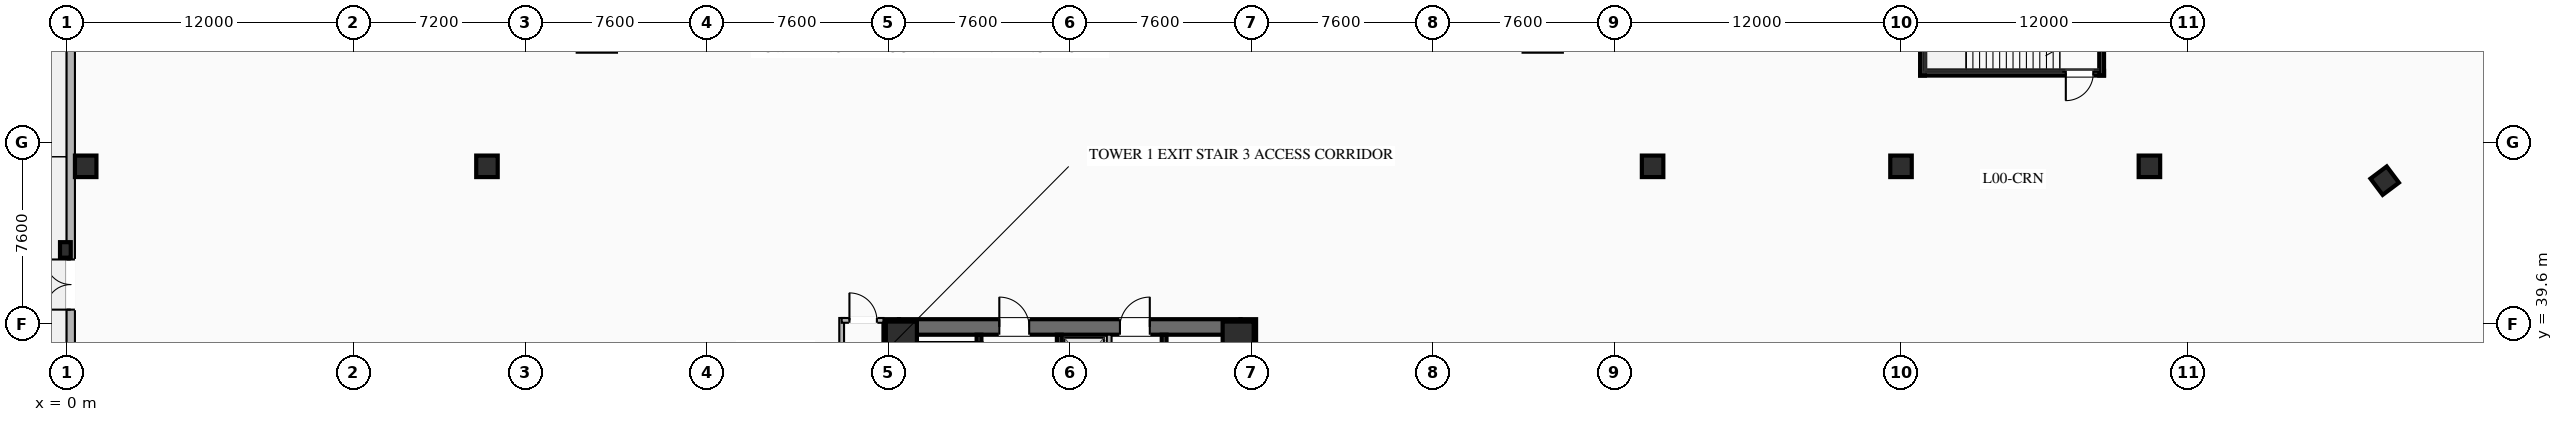
"""IFC4 building model, lengths in metres.
Left out: names, types, materials, properties, quantities, classifications, styles, units other than length and angle.
Written with IfcOpenShell. Run it as: python <this file> out.ifc"""

import sys

from ifc_helpers import new_model, si_unit, direction, frame, frame_2d, origin, origin_2d, place, context, subcontext, project, spatial, rectangle, hollow_rectangle, extrude, element, fill, save


model = new_model("IFC4")
c1 = context("Model", 3, precision=1e-05, world=origin(), true_north=direction((0.0, 1.0)))
c2 = subcontext(c1, "Body", "Model", "MODEL_VIEW")
j1 = project(units=[si_unit("LENGTHUNIT", "METRE"), si_unit("PLANEANGLEUNIT", "RADIAN")], contexts=[c1])
p1 = place(None, origin())
s1 = spatial("IfcSite", under=j1, at=p1, CompositionType="ELEMENT")
p2 = place(p1, origin())
s2 = spatial("IfcBuilding", under=s1, at=p2, CompositionType="ELEMENT")
p3 = place(p2, origin())
s3 = spatial("IfcBuildingStorey", under=s2, at=p3, CompositionType="ELEMENT", Elevation=0.0)
for number, where, z_axis, x_axis in (
    (1, (34.525, 24.2, 0.0), (0.0, 0.0, 1.0), (0.0, 1.0, 0.0)),
    (2, (49.475, 39.8, 0.0), (0.0, 0.0, 1.0), (0.0, -1.0, 0.0)),
):
    element("IfcWall", number, at=place(p3, frame(where, z_axis=z_axis, x_axis=x_axis)), inside=s3, PredefinedType="SHEAR", context=c2, shape_type="SweptSolid", body=[
        extrude(rectangle(XDim=15.6, YDim=0.65, at=frame_2d((7.8, 0.0))), origin(), (0.0, 0.0, 1.0), 5.4),
    ])
p4 = place(p3, frame((34.85, 39.475, 0.0), z_axis=(0.0, 0.0, 1.0), x_axis=(1.0, 0.0, 0.0)))
e3 = element("IfcWall", 3, at=p4, inside=s3, PredefinedType="SHEAR", context=c2, shape_type="SweptSolid", body=[
    extrude(rectangle(XDim=14.3, YDim=0.65, at=frame_2d((7.15, 0.0))), origin(), (0.0, 0.0, 1.0), 5.4),
])
p5 = place(p4, frame((4.2, 0.0, 0.0)))
e4 = element("IfcOpeningElement", 4, at=p5, cuts=e3, PredefinedType="OPENING", context=c2, shape_type="SweptSolid", body=[
    extrude(rectangle(XDim=1.25, YDim=2.25, at=frame_2d((0.625, 1.125))), frame((0.0, 0.335, 0.0), z_axis=(0.0, -1.0, 0.0), x_axis=(1.0, 0.0, 0.0)), (0.0, 0.0, 1.0), 0.67),
])
p6 = place(p4, frame((9.25, 0.0, 0.0)))
e5 = element("IfcOpeningElement", 5, at=p6, cuts=e3, PredefinedType="OPENING", context=c2, shape_type="SweptSolid", body=[
    extrude(rectangle(XDim=1.25, YDim=2.25, at=frame_2d((0.625, 1.125))), frame((0.0, 0.335, 0.0), z_axis=(0.0, -1.0, 0.0), x_axis=(1.0, 0.0, 0.0)), (0.0, 0.0, 1.0), 0.67),
])
for number, where, z_axis, x_axis in (
    (6, (49.05, 39.05, 0.0), (0.0, 0.0, 1.0), (1.0, 0.0, 0.0)),
    (7, (34.95, 39.05, 0.0), (0.0, 0.0, 1.0), (1.0, 0.0, 0.0)),
):
    element("IfcColumn", number, at=place(p3, frame(where, z_axis=z_axis, x_axis=x_axis)), inside=s3, PredefinedType="COLUMN", context=c2, shape_type="SweptSolid", body=[
        extrude(hollow_rectangle(XDim=1.3, YDim=1.3, WallThickness=0.05, at=origin_2d()), origin(), (0.0, 0.0, 1.0), 5.14),
    ])
p7 = place(p3, frame((97.05, 45.6, 0.0), z_axis=(0.0, 0.0, 1.0), x_axis=(0.799999996291, 0.600000004945, 0.0)))
e8 = element("IfcColumn", 8, at=p7, inside=s3, PredefinedType="COLUMN", context=c2, shape_type="SweptSolid", body=[
    extrude(hollow_rectangle(XDim=0.85, YDim=0.85, WallThickness=0.035, at=origin_2d()), origin(), (0.0, 0.0, 1.0), 5.14),
])
for number, where, z_axis, x_axis in (
    (9, (0.8, 46.2, 0.0), (0.0, 0.0, 1.0), (1.0, 0.0, 0.0)),
    (10, (17.6, 46.2, 0.0), (0.0, 0.0, 1.0), (1.0, 0.0, 0.0)),
    (11, (66.4, 46.2, 0.0), (0.0, 0.0, 1.0), (1.0, 0.0, 0.0)),
    (12, (76.8, 46.2, 0.0), (0.0, 0.0, 1.0), (1.0, 0.0, 0.0)),
    (13, (87.2, 46.2, 0.0), (0.0, 0.0, 1.0), (1.0, 0.0, 0.0)),
):
    element("IfcColumn", number, at=place(p3, frame(where, z_axis=z_axis, x_axis=x_axis)), inside=s3, PredefinedType="COLUMN", context=c2, shape_type="SweptSolid", body=[
        extrude(rectangle(XDim=0.9, YDim=0.9, at=origin_2d()), origin(), (0.0, 0.0, 1.0), 5.14),
    ])
p8 = place(p3, frame((0.175, 0.35, 0.0), z_axis=(0.0, 0.0, 1.0), x_axis=(0.0, 1.0, 0.0)))
e14 = element("IfcWall", 14, at=p8, inside=s3, PredefinedType="SOLIDWALL", context=c2, shape_type="SweptSolid", body=[
    extrude(rectangle(XDim=63.3, YDim=0.35, at=frame_2d((31.65, 0.0))), origin(), (0.0, 0.0, 1.0), 5.14),
])
p9 = place(p8, frame((16.15, 0.0, 0.0)))
e15 = element("IfcOpeningElement", 15, at=p9, cuts=e14, PredefinedType="OPENING", context=c2, shape_type="SweptSolid", body=[
    extrude(rectangle(XDim=2.1, YDim=2.5, at=frame_2d((1.05, 1.25))), frame((0.0, 0.185, 0.0), z_axis=(0.0, -1.0, 0.0), x_axis=(1.0, 0.0, 0.0)), (0.0, 0.0, 1.0), 0.37),
])
p10 = place(p8, frame((25.15, 0.0, 0.0)))
e16 = element("IfcOpeningElement", 16, at=p10, cuts=e14, PredefinedType="OPENING", context=c2, shape_type="SweptSolid", body=[
    extrude(rectangle(XDim=2.1, YDim=2.5, at=frame_2d((1.05, 1.25))), frame((0.0, 0.185, 0.0), z_axis=(0.0, -1.0, 0.0), x_axis=(1.0, 0.0, 0.0)), (0.0, 0.0, 1.0), 0.37),
])
p11 = place(p8, frame((34.15, 0.0, 0.0)))
e17 = element("IfcOpeningElement", 17, at=p11, cuts=e14, PredefinedType="OPENING", context=c2, shape_type="SweptSolid", body=[
    extrude(rectangle(XDim=2.1, YDim=2.5, at=frame_2d((1.05, 1.25))), frame((0.0, 0.185, 0.0), z_axis=(0.0, -1.0, 0.0), x_axis=(1.0, 0.0, 0.0)), (0.0, 0.0, 1.0), 0.37),
])
p12 = place(p8, frame((39.85, 0.0, 0.0)))
e18 = element("IfcOpeningElement", 18, at=p12, cuts=e14, PredefinedType="OPENING", context=c2, shape_type="SweptSolid", body=[
    extrude(rectangle(XDim=2.1, YDim=2.5, at=frame_2d((1.05, 1.25))), frame((0.0, 0.185, 0.0), z_axis=(0.0, -1.0, 0.0), x_axis=(1.0, 0.0, 0.0)), (0.0, 0.0, 1.0), 0.37),
])
p13 = place(p3, frame((-0.05, 42.7, 0.0), z_axis=(0.0, 0.0, 1.0), x_axis=(0.0, 1.0, 0.0)))
e19 = element("IfcColumn", 19, at=p13, inside=s3, PredefinedType="PILASTER", context=c2, shape_type="SweptSolid", body=[
    extrude(rectangle(XDim=0.65, YDim=0.45, at=origin_2d()), origin(), (0.0, 0.0, 1.0), 5.14),
])
p14 = place(p3, frame((38.2, 39.15, 0.0), z_axis=(0.0, 0.0, 1.0), x_axis=(0.0, -1.0, 0.0)))
e20 = element("IfcWall", 20, at=p14, inside=s3, PredefinedType="SHEAR", context=c2, shape_type="SweptSolid", body=[
    extrude(rectangle(XDim=7.95, YDim=0.2, at=frame_2d((3.975, 0.0))), origin(), (0.0, 0.0, 1.0), 5.14),
])
p15 = place(p14, frame((6.3, 0.0, 0.0)))
e21 = element("IfcOpeningElement", 21, at=p15, cuts=e20, PredefinedType="OPENING", context=c2, shape_type="SweptSolid", body=[
    extrude(rectangle(XDim=1.15, YDim=2.2, at=frame_2d((0.575, 1.1))), frame((0.0, 0.11, 0.0), z_axis=(0.0, -1.0, 0.0), x_axis=(1.0, 0.0, 0.0)), (0.0, 0.0, 1.0), 0.22),
])
p16 = place(p3, frame((41.56, 24.85, 0.0), z_axis=(0.0, 0.0, 1.0), x_axis=(0.0, 1.0, 0.0)))
e22 = element("IfcWall", 22, at=p16, inside=s3, PredefinedType="SHEAR", context=c2, shape_type="SweptSolid", body=[
    extrude(rectangle(XDim=14.3, YDim=0.2, at=frame_2d((7.15, 0.0))), origin(), (0.0, 0.0, 1.0), 5.14),
])
p17 = place(p3, frame((45.95, 39.15, 0.0), z_axis=(0.0, 0.0, 1.0), x_axis=(0.0, -1.0, 0.0)))
e23 = element("IfcWall", 23, at=p17, inside=s3, PredefinedType="SHEAR", context=c2, shape_type="SweptSolid", body=[
    extrude(rectangle(XDim=6.35, YDim=0.2, at=frame_2d((3.175, 0.0))), origin(), (0.0, 0.0, 1.0), 5.14),
])
p18 = place(p17, frame((4.875, 0.0, 0.0)))
e24 = element("IfcOpeningElement", 24, at=p18, cuts=e23, PredefinedType="OPENING", context=c2, shape_type="SweptSolid", body=[
    extrude(rectangle(XDim=1.1, YDim=2.2, at=frame_2d((0.55, 1.1))), frame((0.0, 0.11, 0.0), z_axis=(0.0, -1.0, 0.0), x_axis=(1.0, 0.0, 0.0)), (0.0, 0.0, 1.0), 0.22),
])
p19 = place(p17, frame((2.825, 0.0, 0.0)))
e25 = element("IfcOpeningElement", 25, at=p19, cuts=e23, PredefinedType="OPENING", context=c2, shape_type="SweptSolid", body=[
    extrude(rectangle(XDim=1.1, YDim=2.2, at=frame_2d((0.55, 1.1))), frame((0.0, 0.11, 0.0), z_axis=(0.0, -1.0, 0.0), x_axis=(1.0, 0.0, 0.0)), (0.0, 0.0, 1.0), 0.22),
])
p20 = place(p17, frame((0.825, 0.0, 0.0)))
e26 = element("IfcOpeningElement", 26, at=p20, cuts=e23, PredefinedType="OPENING", context=c2, shape_type="SweptSolid", body=[
    extrude(rectangle(XDim=1.1, YDim=2.2, at=frame_2d((0.55, 1.1))), frame((0.0, 0.11, 0.0), z_axis=(0.0, -1.0, 0.0), x_axis=(1.0, 0.0, 0.0)), (0.0, 0.0, 1.0), 0.22),
])
p21 = place(p3, frame((43.65, 32.35, 0.0), z_axis=(0.0, 0.0, 1.0), x_axis=(0.0, 1.0, 0.0)))
e27 = element("IfcWall", 27, at=p21, inside=s3, PredefinedType="SOLIDWALL", context=c2, shape_type="SweptSolid", body=[
    extrude(rectangle(XDim=6.8, YDim=0.2, at=frame_2d((3.4, 0.0))), origin(), (0.0, 0.0, 1.0), 5.14),
])
p22 = place(p21, frame((0.575, 0.0, 0.0)))
e28 = element("IfcOpeningElement", 28, at=p22, cuts=e27, PredefinedType="OPENING", context=c2, shape_type="SweptSolid", body=[
    extrude(rectangle(XDim=1.1, YDim=2.2, at=frame_2d((0.55, 1.1))), frame((0.0, 0.11, 0.0), z_axis=(0.0, -1.0, 0.0), x_axis=(1.0, 0.0, 0.0)), (0.0, 0.0, 1.0), 0.22),
])
p23 = place(p21, frame((2.825, 0.0, 0.0)))
e29 = element("IfcOpeningElement", 29, at=p23, cuts=e27, PredefinedType="OPENING", context=c2, shape_type="SweptSolid", body=[
    extrude(rectangle(XDim=1.1, YDim=2.2, at=frame_2d((0.55, 1.1))), frame((0.0, 0.11, 0.0), z_axis=(0.0, -1.0, 0.0), x_axis=(1.0, 0.0, 0.0)), (0.0, 0.0, 1.0), 0.22),
])
p24 = place(p21, frame((5.075, 0.0, 0.0)))
e30 = element("IfcOpeningElement", 30, at=p24, cuts=e27, PredefinedType="OPENING", context=c2, shape_type="SweptSolid", body=[
    extrude(rectangle(XDim=1.1, YDim=2.2, at=frame_2d((0.55, 1.1))), frame((0.0, 0.11, 0.0), z_axis=(0.0, -1.0, 0.0), x_axis=(1.0, 0.0, 0.0)), (0.0, 0.0, 1.0), 0.22),
])
p25 = place(p3, frame((32.45, 35.4, 0.0), z_axis=(0.0, 0.0, 1.0), x_axis=(0.0, 1.0, 0.0)))
e31 = element("IfcWall", 31, at=p25, inside=s3, PredefinedType="SOLIDWALL", context=c2, shape_type="SweptSolid", body=[
    extrude(rectangle(XDim=4.45, YDim=0.2, at=frame_2d((2.225, 0.0))), origin(), (0.0, 0.0, 1.0), 3.31),
])
p26 = place(p3, frame((32.45, 39.75, 0.0), z_axis=(0.0, 0.0, 1.0), x_axis=(1.0, 0.0, 0.0)))
e32 = element("IfcWall", 32, at=p26, inside=s3, PredefinedType="SOLIDWALL", context=c2, shape_type="SweptSolid", body=[
    extrude(rectangle(XDim=1.75, YDim=0.2, at=frame_2d((0.875, 0.0))), origin(), (0.0, 0.0, 1.0), 3.31),
])
p27 = place(p26, frame((0.325, 0.0, 0.0)))
e33 = element("IfcOpeningElement", 33, at=p27, cuts=e32, PredefinedType="OPENING", context=c2, shape_type="SweptSolid", body=[
    extrude(rectangle(XDim=1.15, YDim=2.2, at=frame_2d((0.575, 1.1))), frame((0.0, 0.11, 0.0), z_axis=(0.0, -1.0, 0.0), x_axis=(1.0, 0.0, 0.0)), (0.0, 0.0, 1.0), 0.22),
])
p28 = place(p3, frame((85.3, 50.1, 0.0), z_axis=(0.0, 0.0, 1.0), x_axis=(-1.0, 0.0, 0.0)))
e34 = element("IfcWall", 34, at=p28, inside=s3, PredefinedType="SHEAR", context=c2, shape_type="SweptSolid", body=[
    extrude(rectangle(XDim=7.7, YDim=0.2, at=frame_2d((3.85, 0.0))), origin(), (0.0, 0.0, 1.0), 5.14),
])
p29 = place(p28, frame((0.45, 0.0, 0.0)))
e35 = element("IfcOpeningElement", 35, at=p29, cuts=e34, PredefinedType="OPENING", context=c2, shape_type="SweptSolid", body=[
    extrude(rectangle(XDim=1.15, YDim=2.2, at=frame_2d((0.575, 1.1))), frame((0.0, 0.11, 0.0), z_axis=(0.0, -1.0, 0.0), x_axis=(1.0, 0.0, 0.0)), (0.0, 0.0, 1.0), 0.22),
])
for number, where, z_axis, x_axis in (
    (36, (77.7, 50.0, 0.0), (0.0, 0.0, 1.0), (0.0, 1.0, 0.0)),
    (37, (85.2, 50.0, 0.0), (0.0, 0.0, 1.0), (0.0, 1.0, 0.0)),
):
    element("IfcWall", number, at=place(p3, frame(where, z_axis=z_axis, x_axis=x_axis)), inside=s3, PredefinedType="SHEAR", context=c2, shape_type="SweptSolid", body=[
        extrude(rectangle(XDim=3.9, YDim=0.2, at=frame_2d((1.95, 0.0))), origin(), (0.0, 0.0, 1.0), 5.14),
    ])
p30 = place(p12, origin())
e38 = element("IfcDoor", 38, at=p30, inside=s3, OperationType="DOUBLE_DOOR_SINGLE_SWING", PredefinedType="DOOR", context=c2, shape_type="SweptSolid", body=[
    extrude(rectangle(XDim=2.1, YDim=2.5, at=frame_2d((1.05, 1.25))), frame((0.0, 0.025, 0.0), z_axis=(0.0, -1.0, 0.0), x_axis=(1.0, 0.0, 0.0)), (0.0, 0.0, 1.0), 0.05),
])
fill(e18, e38)
p31 = place(p5, origin())
e39 = element("IfcDoor", 39, at=p31, inside=s3, OperationType="SINGLE_SWING_LEFT", PredefinedType="DOOR", context=c2, shape_type="SweptSolid", body=[
    extrude(rectangle(XDim=1.25, YDim=2.25, at=frame_2d((0.625, 1.125))), frame((0.0, 0.025, 0.0), z_axis=(0.0, -1.0, 0.0), x_axis=(1.0, 0.0, 0.0)), (0.0, 0.0, 1.0), 0.05),
])
fill(e4, e39)
p32 = place(p6, origin())
e40 = element("IfcDoor", 40, at=p32, inside=s3, OperationType="SINGLE_SWING_RIGHT", PredefinedType="DOOR", context=c2, shape_type="SweptSolid", body=[
    extrude(rectangle(XDim=1.25, YDim=2.25, at=frame_2d((0.625, 1.125))), frame((0.0, 0.025, 0.0), z_axis=(0.0, -1.0, 0.0), x_axis=(1.0, 0.0, 0.0)), (0.0, 0.0, 1.0), 0.05),
])
fill(e5, e40)
p33 = place(p27, origin())
e41 = element("IfcDoor", 41, at=p33, inside=s3, OperationType="SINGLE_SWING_LEFT", PredefinedType="DOOR", context=c2, shape_type="SweptSolid", body=[
    extrude(rectangle(XDim=1.15, YDim=2.2, at=frame_2d((0.575, 1.1))), frame((0.0, 0.025, 0.0), z_axis=(0.0, -1.0, 0.0), x_axis=(1.0, 0.0, 0.0)), (0.0, 0.0, 1.0), 0.05),
])
fill(e33, e41)
p34 = place(p29, origin())
e42 = element("IfcDoor", 42, at=p34, inside=s3, OperationType="SINGLE_SWING_RIGHT", PredefinedType="DOOR", context=c2, shape_type="SweptSolid", body=[
    extrude(rectangle(XDim=1.15, YDim=2.2, at=frame_2d((0.575, 1.1))), frame((0.0, 0.025, 0.0), z_axis=(0.0, -1.0, 0.0), x_axis=(1.0, 0.0, 0.0)), (0.0, 0.0, 1.0), 0.05),
])
fill(e35, e42)
save(model, sys.argv[1])
